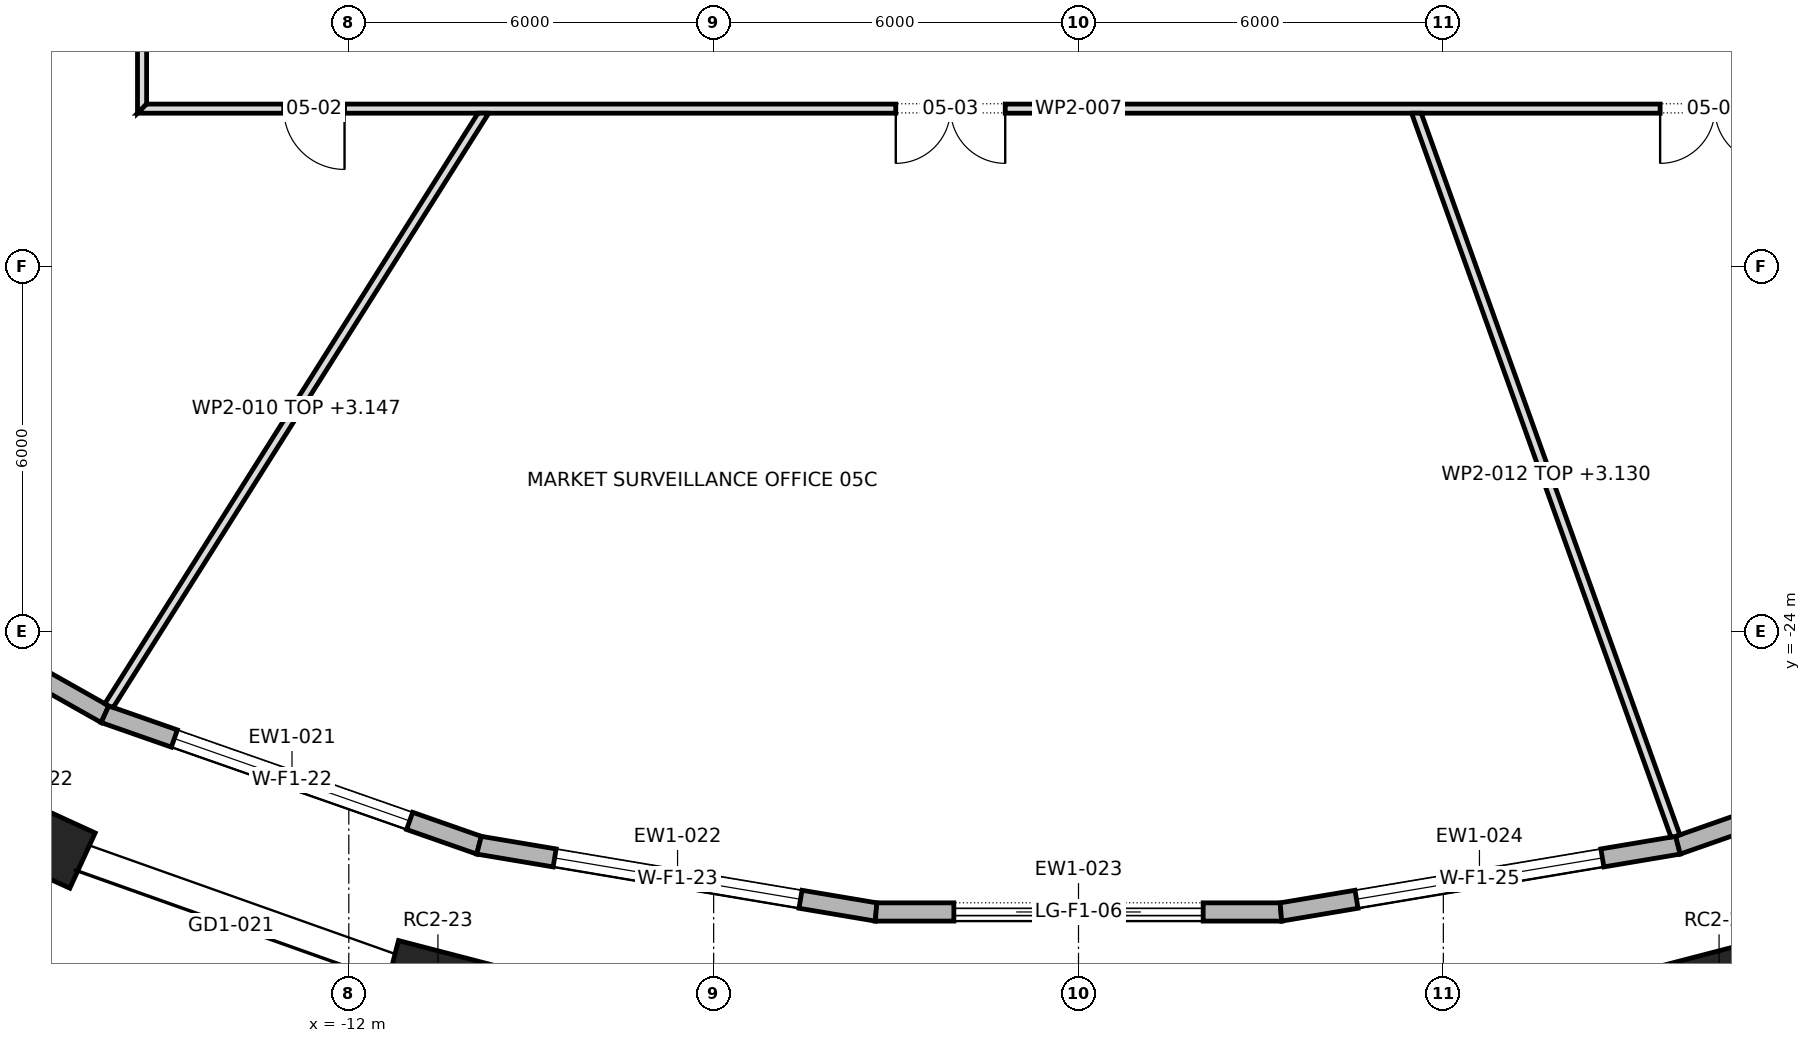
"""IFC4 building model, lengths in metres.
Left out: names, types, materials, properties, quantities, classifications, styles, units other than length and angle.
Written with IfcOpenShell. Run it as: python <this file> out.ifc"""

import sys

from ifc_helpers import new_model, si_unit, direction, frame, frame_2d, origin, origin_2d, place, context, subcontext, project, spatial, polyline, rectangle, outline, extrude, element, fill, save


model = new_model("IFC4")
c1 = context("Model", 3, precision=1e-05, world=origin(), true_north=direction((0.0, 1.0)))
c2 = subcontext(c1, "Body", "Model", "MODEL_VIEW")
j1 = project(units=[si_unit("LENGTHUNIT", "METRE"), si_unit("PLANEANGLEUNIT", "RADIAN")], contexts=[c1])
p1 = place(None, origin())
s1 = spatial("IfcSite", under=j1, at=p1, CompositionType="ELEMENT")
p2 = place(p1, origin())
s2 = spatial("IfcBuilding", under=s1, at=p2, CompositionType="ELEMENT")
p3 = place(p2, frame((0.0, 0.0, 82.3)))
s3 = spatial("IfcBuildingStorey", under=s2, at=p3, CompositionType="ELEMENT", Elevation=82.3)
for number, where, z_axis, x_axis in (
    (1, (-17.107, -27.432, 0.0), (0.0, 0.0, 1.0), (0.909, -0.417, 0.0)),
    (2, (-10.534, -29.766, 0.0), (0.0, 0.0, 1.0), (0.968, -0.252, 0.0)),
    (3, (10.534, -29.766, 0.0), (0.0, 0.0, 1.0), (0.968, 0.252, 0.0)),
):
    element("IfcColumn", number, at=place(p3, frame(where, z_axis=z_axis, x_axis=x_axis)), inside=s3, PredefinedType="COLUMN", context=c2, shape_type="SweptSolid", body=[
        extrude(rectangle(XDim=1.6, YDim=1.0, at=origin_2d()), origin(), (0.0, 0.0, 1.0), 4.2),
    ])
p4 = place(p3, frame((-21.549, -22.231, 0.0), z_axis=(0.0, 0.0, 1.0), x_axis=(0.870710061474, -0.491796694629, 0.0)))
e4 = element("IfcWall", 4, at=p4, inside=s3, PredefinedType="STANDARD", context=c2, shape_type="SweptSolid", body=[
    extrude(outline(polyline([(-0.014, -0.15), (6.374, -0.15), (6.347, 0.15), (0.014, 0.15), (-0.014, -0.15)])), origin(), (0.0, 0.0, 1.0), 3.9),
])
p5 = place(p4, frame((1.13, 0.0, 0.6)))
e5 = element("IfcOpeningElement", 5, at=p5, cuts=e4, PredefinedType="OPENING", context=c2, shape_type="SweptSolid", body=[
    extrude(rectangle(XDim=4.1, YDim=2.85, at=frame_2d((2.05, 1.425))), frame((0.0, 0.162, 0.0), z_axis=(0.0, -1.0, 0.0), x_axis=(1.0, 0.0, 0.0)), (0.0, 0.0, 1.0), 0.324),
])
p6 = place(p3, frame((-16.01, -25.359, 0.0), z_axis=(0.0, 0.0, 1.0), x_axis=(0.943815136299, -0.330473884736, 0.0)))
e6 = element("IfcWall", 6, at=p6, inside=s3, PredefinedType="STANDARD", context=c2, shape_type="SweptSolid", body=[
    extrude(outline(polyline([(-0.013, -0.15), (6.531, -0.15), (6.505, 0.15), (0.013, 0.15), (-0.013, -0.15)])), origin(), (0.0, 0.0, 1.0), 3.9),
])
p7 = place(p6, frame((1.209, 0.0, 0.6)))
e7 = element("IfcOpeningElement", 7, at=p7, cuts=e6, PredefinedType="OPENING", context=c2, shape_type="SweptSolid", body=[
    extrude(rectangle(XDim=4.1, YDim=2.85, at=frame_2d((2.05, 1.425))), frame((0.0, 0.162, 0.0), z_axis=(0.0, -1.0, 0.0), x_axis=(1.0, 0.0, 0.0)), (0.0, 0.0, 1.0), 0.324),
])
p8 = place(p3, frame((-9.858, -27.513, 0.0), z_axis=(0.0, 0.0, 1.0), x_axis=(0.986157735925, -0.165809890767, 0.0)))
e8 = element("IfcWall", 8, at=p8, inside=s3, PredefinedType="STANDARD", context=c2, shape_type="SweptSolid", body=[
    extrude(outline(polyline([(-0.013, -0.15), (6.634, -0.15), (6.609, 0.15), (0.013, 0.15), (-0.013, -0.15)])), origin(), (0.0, 0.0, 1.0), 3.9),
])
p9 = place(p8, frame((1.261, 0.0, 0.6)))
e9 = element("IfcOpeningElement", 9, at=p9, cuts=e8, PredefinedType="OPENING", context=c2, shape_type="SweptSolid", body=[
    extrude(rectangle(XDim=4.1, YDim=2.85, at=frame_2d((2.05, 1.425))), frame((0.0, 0.162, 0.0), z_axis=(0.0, -1.0, 0.0), x_axis=(1.0, 0.0, 0.0)), (0.0, 0.0, 1.0), 0.324),
])
p10 = place(p3, frame((-3.329, -28.611, 0.0), z_axis=(0.0, 0.0, 1.0), x_axis=(1.0, 0.0, 0.0)))
e10 = element("IfcWall", 10, at=p10, inside=s3, PredefinedType="STANDARD", context=c2, shape_type="SweptSolid", body=[
    extrude(outline(polyline([(-0.012, -0.15), (6.67, -0.15), (6.645, 0.15), (0.012, 0.15), (-0.012, -0.15)])), origin(), (0.0, 0.0, 1.0), 3.9),
])
p11 = place(p10, frame((1.279, 0.0, 0.0)))
e11 = element("IfcOpeningElement", 11, at=p11, cuts=e10, PredefinedType="OPENING", context=c2, shape_type="SweptSolid", body=[
    extrude(rectangle(XDim=4.1, YDim=3.45, at=frame_2d((2.05, 1.725))), frame((0.0, 0.162, 0.0), z_axis=(0.0, -1.0, 0.0), x_axis=(1.0, 0.0, 0.0)), (0.0, 0.0, 1.0), 0.324),
])
p12 = place(p3, frame((3.329, -28.611, 0.0), z_axis=(0.0, 0.0, 1.0), x_axis=(0.986157735925, 0.165809890767, 0.0)))
e12 = element("IfcWall", 12, at=p12, inside=s3, PredefinedType="STANDARD", context=c2, shape_type="SweptSolid", body=[
    extrude(outline(polyline([(-0.012, -0.15), (6.634, -0.15), (6.609, 0.15), (0.012, 0.15), (-0.012, -0.15)])), origin(), (0.0, 0.0, 1.0), 3.9),
])
p13 = place(p12, frame((1.261, 0.0, 0.6)))
e13 = element("IfcOpeningElement", 13, at=p13, cuts=e12, PredefinedType="OPENING", context=c2, shape_type="SweptSolid", body=[
    extrude(rectangle(XDim=4.1, YDim=2.85, at=frame_2d((2.05, 1.425))), frame((0.0, 0.162, 0.0), z_axis=(0.0, -1.0, 0.0), x_axis=(1.0, 0.0, 0.0)), (0.0, 0.0, 1.0), 0.324),
])
p14 = place(p3, frame((9.858, -27.513, 0.0), z_axis=(0.0, 0.0, 1.0), x_axis=(0.943815136299, 0.330473884736, 0.0)))
e14 = element("IfcWall", 14, at=p14, inside=s3, PredefinedType="STANDARD", context=c2, shape_type="SweptSolid", body=[
    extrude(outline(polyline([(-0.013, -0.15), (6.531, -0.15), (6.505, 0.15), (0.013, 0.15), (-0.013, -0.15)])), origin(), (0.0, 0.0, 1.0), 3.9),
])
p15 = place(p14, frame((1.209, 0.0, 0.6)))
e15 = element("IfcOpeningElement", 15, at=p15, cuts=e14, PredefinedType="OPENING", context=c2, shape_type="SweptSolid", body=[
    extrude(rectangle(XDim=4.1, YDim=2.85, at=frame_2d((2.05, 1.425))), frame((0.0, 0.162, 0.0), z_axis=(0.0, -1.0, 0.0), x_axis=(1.0, 0.0, 0.0)), (0.0, 0.0, 1.0), 0.324),
])
p16 = place(p3, frame((-26.158, -18.142, 0.0), z_axis=(0.0, 0.0, 1.0), x_axis=(0.821670699987, 0.569962508226, 0.0)))
e16 = element("IfcWall", 16, at=p16, inside=s3, PredefinedType="PARTITIONING", context=c2, shape_type="SweptSolid", body=[
    extrude(outline(polyline([(0.024, -0.075), (1.87, -0.075), (3.717, -0.075), (5.563, -0.075), (7.41, -0.075), (9.257, -0.075), (11.103, -0.075), (12.95, -0.075), (13.003, 0.002), (13.003, 0.002), (13.053, 0.074), (13.053, 0.075), (11.279, 0.075), (9.504, 0.075), (7.729, 0.075), (7.728, 0.073), (7.726, 0.075), (5.794, 0.075), (3.863, 0.075), (1.931, 0.075), (0.0, 0.075), (0.0, 0.073), (0.005, -0.004), (0.024, -0.075)])), origin(), (0.0, 0.0, 1.0), 3.1),
])
p17 = place(p3, frame((-15.4, -15.475, 0.0), z_axis=(0.0, 0.0, 1.0), x_axis=(0.0, 1.0, 0.0)))
e17 = element("IfcWall", 17, at=p17, inside=s3, PredefinedType="PARTITIONING", context=c2, shape_type="SweptSolid", body=[
    extrude(outline(polyline([(0.15, -0.075), (2.066, -0.075), (3.981, -0.075), (5.897, -0.075), (7.812, -0.075), (9.728, -0.075), (11.644, -0.075), (13.56, -0.075), (15.475, -0.075), (17.391, -0.075), (19.306, -0.075), (21.222, -0.075), (23.138, -0.075), (25.053, -0.075), (26.969, -0.075), (28.885, -0.075), (30.8, -0.075), (30.95, 0.075), (29.016, 0.075), (27.081, 0.075), (25.147, 0.075), (23.212, 0.075), (21.278, 0.075), (19.344, 0.075), (17.409, 0.075), (15.475, 0.075), (13.541, 0.075), (11.606, 0.075), (9.672, 0.075), (7.738, 0.075), (5.803, 0.075), (3.869, 0.075), (1.935, 0.075), (0.0, 0.075), (0.15, -0.075)])), origin(), (0.0, 0.0, 1.0), 3.9),
])
p18 = place(p17, frame((10.275, 0.0, 0.0)))
e18 = element("IfcOpeningElement", 18, at=p18, cuts=e17, PredefinedType="OPENING", context=c2, shape_type="SweptSolid", body=[
    extrude(rectangle(XDim=1.0, YDim=2.1, at=frame_2d((0.5, 1.05))), frame((0.0, 0.087, 0.0), z_axis=(0.0, -1.0, 0.0), x_axis=(1.0, 0.0, 0.0)), (0.0, 0.0, 1.0), 0.174),
])
p19 = place(p17, frame((22.915, 0.0, 0.0)))
e19 = element("IfcOpeningElement", 19, at=p19, cuts=e17, PredefinedType="OPENING", context=c2, shape_type="SweptSolid", body=[
    extrude(rectangle(XDim=1.8, YDim=2.1, at=frame_2d((0.9, 1.05))), frame((0.0, 0.087, 0.0), z_axis=(0.0, -1.0, 0.0), x_axis=(1.0, 0.0, 0.0)), (0.0, 0.0, 1.0), 0.174),
])
p20 = place(p3, frame((-15.475, -15.4, 0.0), z_axis=(0.0, 0.0, 1.0), x_axis=(1.0, 0.0, 0.0)))
e20 = element("IfcWall", 20, at=p20, inside=s3, PredefinedType="PARTITIONING", context=c2, shape_type="SweptSolid", body=[
    extrude(outline(polyline([(0.0, -0.075), (1.935, -0.075), (3.869, -0.075), (5.803, -0.075), (7.738, -0.075), (9.672, -0.075), (11.606, -0.075), (13.541, -0.075), (15.475, -0.075), (17.409, -0.075), (19.344, -0.075), (21.278, -0.075), (23.212, -0.075), (25.147, -0.075), (27.081, -0.075), (29.016, -0.075), (30.95, -0.075), (30.8, 0.075), (28.885, 0.075), (26.969, 0.075), (25.053, 0.075), (23.138, 0.075), (21.222, 0.075), (19.306, 0.075), (17.391, 0.075), (15.475, 0.075), (13.56, 0.075), (11.644, 0.075), (9.728, 0.075), (7.812, 0.075), (5.897, 0.075), (3.981, 0.075), (2.066, 0.075), (0.15, 0.075), (0.0, -0.075)])), origin(), (0.0, 0.0, 1.0), 3.9),
])
p21 = place(p20, frame((2.405, 0.0, 0.0)))
e21 = element("IfcOpeningElement", 21, at=p21, cuts=e20, PredefinedType="OPENING", context=c2, shape_type="SweptSolid", body=[
    extrude(rectangle(XDim=1.0, YDim=2.1, at=frame_2d((0.5, 1.05))), frame((0.0, 0.087, 0.0), z_axis=(0.0, -1.0, 0.0), x_axis=(1.0, 0.0, 0.0)), (0.0, 0.0, 1.0), 0.174),
])
p22 = place(p20, frame((12.47, 0.0, 0.0)))
e22 = element("IfcOpeningElement", 22, at=p22, cuts=e20, PredefinedType="OPENING", context=c2, shape_type="SweptSolid", body=[
    extrude(rectangle(XDim=1.8, YDim=2.1, at=frame_2d((0.9, 1.05))), frame((0.0, 0.087, 0.0), z_axis=(0.0, -1.0, 0.0), x_axis=(1.0, 0.0, 0.0)), (0.0, 0.0, 1.0), 0.174),
])
p23 = place(p20, frame((25.04, 0.0, 0.0)))
e23 = element("IfcOpeningElement", 23, at=p23, cuts=e20, PredefinedType="OPENING", context=c2, shape_type="SweptSolid", body=[
    extrude(rectangle(XDim=1.8, YDim=2.1, at=frame_2d((0.9, 1.05))), frame((0.0, 0.087, 0.0), z_axis=(0.0, -1.0, 0.0), x_axis=(1.0, 0.0, 0.0)), (0.0, 0.0, 1.0), 0.174),
])
p24 = place(p3, frame((-9.762, -15.435, 0.0), z_axis=(0.0, 0.0, 1.0), x_axis=(-0.534199196173, -0.845358633249, 0.0)))
e24 = element("IfcWall", 24, at=p24, inside=s3, PredefinedType="PARTITIONING", context=c2, shape_type="SweptSolid", body=[
    extrude(outline(polyline([(11.581, -0.075), (11.581, -0.066), (11.578, -0.001), (11.56, 0.075), (9.633, 0.075), (7.707, 0.075), (5.78, 0.075), (3.853, 0.075), (1.927, 0.075), (0.0, 0.075), (0.0, 0.075), (0.095, -0.075), (2.009, -0.075), (3.923, -0.075), (5.838, -0.075), (7.752, -0.075), (9.667, -0.075), (11.581, -0.075)])), origin(), (0.0, 0.0, 1.0), 3.147),
])
p25 = place(p3, frame((5.548, -15.45, 0.0), z_axis=(0.0, 0.0, 1.0), x_axis=(0.337357475529, -0.941376616294, 0.0)))
e25 = element("IfcWall", 25, at=p25, inside=s3, PredefinedType="PARTITIONING", context=c2, shape_type="SweptSolid", body=[
    extrude(outline(polyline([(0.0, -0.075), (1.807, -0.075), (3.613, -0.075), (5.42, -0.075), (7.226, -0.075), (9.033, -0.075), (10.84, -0.075), (12.646, -0.075), (12.66, 0.002), (12.66, 0.018), (12.66, 0.075), (10.859, 0.075), (9.058, 0.075), (7.257, 0.075), (5.456, 0.075), (3.655, 0.075), (1.854, 0.075), (0.053, 0.075), (0.0, -0.074), (0.0, -0.075)])), origin(), (0.0, 0.0, 1.0), 3.13),
])
p26 = place(p7, origin())
e26 = element("IfcWindow", 26, at=p26, inside=s3, PartitioningType="TRIPLE_PANEL_VERTICAL", PredefinedType="WINDOW", context=c2, shape_type="SweptSolid", body=[
    extrude(rectangle(XDim=4.1, YDim=2.85, at=frame_2d((2.05, 1.425))), frame((0.0, 0.03, 0.0), z_axis=(0.0, -1.0, 0.0), x_axis=(1.0, 0.0, 0.0)), (0.0, 0.0, 1.0), 0.06),
])
fill(e7, e26)
p27 = place(p9, origin())
e27 = element("IfcWindow", 27, at=p27, inside=s3, PartitioningType="TRIPLE_PANEL_VERTICAL", PredefinedType="WINDOW", context=c2, shape_type="SweptSolid", body=[
    extrude(rectangle(XDim=4.1, YDim=2.85, at=frame_2d((2.05, 1.425))), frame((0.0, 0.03, 0.0), z_axis=(0.0, -1.0, 0.0), x_axis=(1.0, 0.0, 0.0)), (0.0, 0.0, 1.0), 0.06),
])
fill(e9, e27)
p28 = place(p11, origin())
e28 = element("IfcDoor", 28, at=p28, inside=s3, OperationType="DOUBLE_DOOR_SLIDING", PredefinedType="DOOR", context=c2, shape_type="SweptSolid", body=[
    extrude(rectangle(XDim=4.1, YDim=3.45, at=frame_2d((2.05, 1.725))), frame((0.0, 0.025, 0.0), z_axis=(0.0, -1.0, 0.0), x_axis=(1.0, 0.0, 0.0)), (0.0, 0.0, 1.0), 0.05),
])
fill(e11, e28)
p29 = place(p13, origin())
e29 = element("IfcWindow", 29, at=p29, inside=s3, PartitioningType="TRIPLE_PANEL_VERTICAL", PredefinedType="WINDOW", context=c2, shape_type="SweptSolid", body=[
    extrude(rectangle(XDim=4.1, YDim=2.85, at=frame_2d((2.05, 1.425))), frame((0.0, 0.03, 0.0), z_axis=(0.0, -1.0, 0.0), x_axis=(1.0, 0.0, 0.0)), (0.0, 0.0, 1.0), 0.06),
])
fill(e13, e29)
p30 = place(p21, frame((1.0, 0.0, 0.0), z_axis=(0.0, 0.0, 1.0), x_axis=(-1.0, 0.0, 0.0)))
e30 = element("IfcDoor", 30, at=p30, inside=s3, OperationType="SINGLE_SWING_RIGHT", PredefinedType="DOOR", context=c2, shape_type="SweptSolid", body=[
    extrude(rectangle(XDim=1.0, YDim=2.1, at=frame_2d((0.5, 1.05))), frame((0.0, 0.025, 0.0), z_axis=(0.0, -1.0, 0.0), x_axis=(1.0, 0.0, 0.0)), (0.0, 0.0, 1.0), 0.05),
])
fill(e21, e30)
p31 = place(p22, frame((1.8, 0.0, 0.0), z_axis=(0.0, 0.0, 1.0), x_axis=(-1.0, 0.0, 0.0)))
e31 = element("IfcDoor", 31, at=p31, inside=s3, OperationType="DOUBLE_DOOR_SINGLE_SWING", PredefinedType="DOOR", context=c2, shape_type="SweptSolid", body=[
    extrude(rectangle(XDim=1.8, YDim=2.1, at=frame_2d((0.9, 1.05))), frame((0.0, 0.025, 0.0), z_axis=(0.0, -1.0, 0.0), x_axis=(1.0, 0.0, 0.0)), (0.0, 0.0, 1.0), 0.05),
])
fill(e22, e31)
p32 = place(p23, frame((1.8, 0.0, 0.0), z_axis=(0.0, 0.0, 1.0), x_axis=(-1.0, 0.0, 0.0)))
e32 = element("IfcDoor", 32, at=p32, inside=s3, OperationType="DOUBLE_DOOR_SINGLE_SWING", PredefinedType="DOOR", context=c2, shape_type="SweptSolid", body=[
    extrude(rectangle(XDim=1.8, YDim=2.1, at=frame_2d((0.9, 1.05))), frame((0.0, 0.025, 0.0), z_axis=(0.0, -1.0, 0.0), x_axis=(1.0, 0.0, 0.0)), (0.0, 0.0, 1.0), 0.05),
])
fill(e23, e32)
save(model, sys.argv[1])
